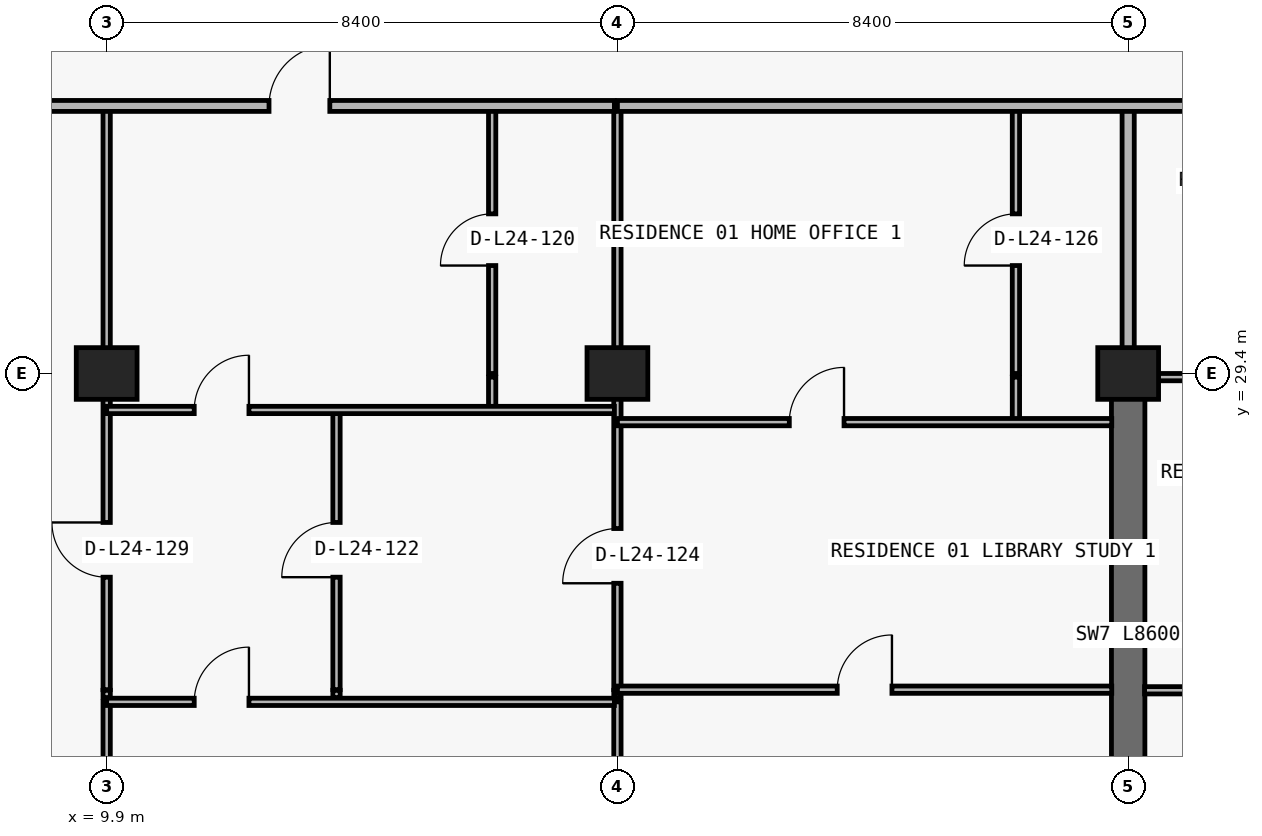
"""IFC4 building model, lengths in metres.
Left out: names, types, materials, properties, quantities, classifications, styles, units other than length and angle.
Written with IfcOpenShell. Run it as: python <this file> out.ifc"""

import sys

from ifc_helpers import new_model, si_unit, direction, frame, frame_2d, origin, origin_2d, place, context, subcontext, project, spatial, rectangle, extrude, element, fill, save


model = new_model("IFC4")
c1 = context("Model", 3, precision=1e-05, world=origin(), true_north=direction((0.0, 1.0)))
c2 = subcontext(c1, "Body", "Model", "MODEL_VIEW")
j1 = project(units=[si_unit("LENGTHUNIT", "METRE"), si_unit("PLANEANGLEUNIT", "RADIAN")], contexts=[c1])
p1 = place(None, origin())
s1 = spatial("IfcSite", under=j1, at=p1, CompositionType="ELEMENT")
p2 = place(p1, origin())
s2 = spatial("IfcBuilding", under=s1, at=p2, CompositionType="ELEMENT")
p3 = place(p2, frame((0.0, 0.0, 91.2)))
s3 = spatial("IfcBuildingStorey", under=s2, at=p3, CompositionType="ELEMENT", Elevation=91.2)
for number, where, z_axis, x_axis in (
    (1, (9.9, 29.4, 0.0), (0.0, 0.0, 1.0), (1.0, 0.0, 0.0)),
    (2, (18.3, 29.4, 0.0), (0.0, 0.0, 1.0), (1.0, 0.0, 0.0)),
    (3, (26.7, 29.4, 0.0), (0.0, 0.0, 1.0), (1.0, 0.0, 0.0)),
):
    element("IfcColumn", number, at=place(p3, frame(where, z_axis=z_axis, x_axis=x_axis)), inside=s3, PredefinedType="COLUMN", context=c2, shape_type="SweptSolid", body=[
        extrude(rectangle(XDim=1.0, YDim=0.85, at=origin_2d()), origin(), (0.0, 0.0, 1.0), 3.05),
    ])
p4 = place(p3, frame((26.7, 20.8, 0.0), z_axis=(0.0, 0.0, 1.0), x_axis=(0.0, 1.0, 0.0)))
e4 = element("IfcWall", 4, at=p4, inside=s3, PredefinedType="SHEAR", context=c2, shape_type="SweptSolid", body=[
    extrude(rectangle(XDim=8.6, YDim=0.55, at=frame_2d((4.3, 0.0))), origin(), (0.0, 0.0, 1.0), 3.05),
])
p5 = place(p3, frame((9.9, 8.84, 0.0), z_axis=(0.0, 0.0, 1.0), x_axis=(0.0, 1.0, 0.0)))
e5 = element("IfcWall", 5, at=p5, inside=s3, PredefinedType="PARTITIONING", context=c2, shape_type="SweptSolid", body=[
    extrude(rectangle(XDim=15.16, YDim=0.12, at=frame_2d((7.58, 0.0))), origin(), (0.0, 0.0, 1.0), 2.174),
])
p6 = place(p3, frame((9.9, 24.07, 0.0), z_axis=(0.0, 0.0, 1.0), x_axis=(0.0, 1.0, 0.0)))
e6 = element("IfcWall", 6, at=p6, inside=s3, PredefinedType="PARTITIONING", context=c2, shape_type="SweptSolid", body=[
    extrude(rectangle(XDim=0.12, YDim=0.12, at=frame_2d((0.06, 0.0))), origin(), (0.0, 0.0, 1.0), 2.174),
])
p7 = place(p3, frame((9.9, 24.2, 0.0), z_axis=(0.0, 0.0, 1.0), x_axis=(0.0, 1.0, 0.0)))
e7 = element("IfcWall", 7, at=p7, inside=s3, PredefinedType="PARTITIONING", context=c2, shape_type="SweptSolid", body=[
    extrude(rectangle(XDim=5.14, YDim=0.12, at=frame_2d((2.57, 0.0))), origin(), (0.0, 0.0, 1.0), 2.174),
])
p8 = place(p7, frame((1.85, 0.0, 0.0)))
e8 = element("IfcOpeningElement", 8, at=p8, cuts=e7, PredefinedType="OPENING", context=c2, shape_type="SweptSolid", body=[
    extrude(rectangle(XDim=0.9, YDim=2.124, at=frame_2d((0.45, 1.062))), frame((0.0, 0.07, 0.0), z_axis=(0.0, -1.0, 0.0), x_axis=(1.0, 0.0, 0.0)), (0.0, 0.0, 1.0), 0.14),
])
p9 = place(p3, frame((9.9, 29.4, 0.0), z_axis=(0.0, 0.0, 1.0), x_axis=(0.0, 1.0, 0.0)))
e9 = element("IfcWall", 9, at=p9, inside=s3, PredefinedType="PARTITIONING", context=c2, shape_type="SweptSolid", body=[
    extrude(rectangle(XDim=4.4, YDim=0.12, at=frame_2d((2.2, 0.0))), origin(), (0.0, 0.0, 1.0), 2.174),
])
p10 = place(p3, frame((13.68, 24.07, 0.0), z_axis=(0.0, 0.0, 1.0), x_axis=(0.0, 1.0, 0.0)))
e10 = element("IfcWall", 10, at=p10, inside=s3, PredefinedType="PARTITIONING", context=c2, shape_type="SweptSolid", body=[
    extrude(rectangle(XDim=0.12, YDim=0.12, at=frame_2d((0.06, 0.0))), origin(), (0.0, 0.0, 1.0), 3.05),
])
p11 = place(p3, frame((13.68, 24.2, 0.0), z_axis=(0.0, 0.0, 1.0), x_axis=(0.0, 1.0, 0.0)))
e11 = element("IfcWall", 11, at=p11, inside=s3, PredefinedType="PARTITIONING", context=c2, shape_type="SweptSolid", body=[
    extrude(rectangle(XDim=4.6, YDim=0.12, at=frame_2d((2.3, 0.0))), origin(), (0.0, 0.0, 1.0), 3.05),
])
p12 = place(p11, frame((1.85, 0.0, 0.0)))
e12 = element("IfcOpeningElement", 12, at=p12, cuts=e11, PredefinedType="OPENING", context=c2, shape_type="SweptSolid", body=[
    extrude(rectangle(XDim=0.9, YDim=2.15, at=frame_2d((0.45, 1.075))), frame((0.0, 0.07, 0.0), z_axis=(0.0, -1.0, 0.0), x_axis=(1.0, 0.0, 0.0)), (0.0, 0.0, 1.0), 0.14),
])
p13 = place(p3, frame((16.24, 28.8, 0.0), z_axis=(0.0, 0.0, 1.0), x_axis=(0.0, 1.0, 0.0)))
e13 = element("IfcWall", 13, at=p13, inside=s3, PredefinedType="PARTITIONING", context=c2, shape_type="SweptSolid", body=[
    extrude(rectangle(XDim=0.54, YDim=0.12, at=frame_2d((0.27, 0.0))), origin(), (0.0, 0.0, 1.0), 3.05),
])
p14 = place(p3, frame((16.24, 29.4, 0.0), z_axis=(0.0, 0.0, 1.0), x_axis=(0.0, 1.0, 0.0)))
e14 = element("IfcWall", 14, at=p14, inside=s3, PredefinedType="PARTITIONING", context=c2, shape_type="SweptSolid", body=[
    extrude(rectangle(XDim=4.4, YDim=0.12, at=frame_2d((2.2, 0.0))), origin(), (0.0, 0.0, 1.0), 3.05),
])
p15 = place(p14, frame((1.775, 0.0, 0.0)))
e15 = element("IfcOpeningElement", 15, at=p15, cuts=e14, PredefinedType="OPENING", context=c2, shape_type="SweptSolid", body=[
    extrude(rectangle(XDim=0.85, YDim=2.1, at=frame_2d((0.425, 1.05))), frame((0.0, 0.07, 0.0), z_axis=(0.0, -1.0, 0.0), x_axis=(1.0, 0.0, 0.0)), (0.0, 0.0, 1.0), 0.14),
])
p16 = place(p3, frame((18.3, 8.84, 0.0), z_axis=(0.0, 0.0, 1.0), x_axis=(0.0, 1.0, 0.0)))
e16 = element("IfcWall", 16, at=p16, inside=s3, PredefinedType="PARTITIONING", context=c2, shape_type="SweptSolid", body=[
    extrude(rectangle(XDim=15.16, YDim=0.12, at=frame_2d((7.58, 0.0))), origin(), (0.0, 0.0, 1.0), 2.174),
])
p17 = place(p3, frame((18.3, 24.07, 0.0), z_axis=(0.0, 0.0, 1.0), x_axis=(0.0, 1.0, 0.0)))
e17 = element("IfcWall", 17, at=p17, inside=s3, PredefinedType="PARTITIONING", context=c2, shape_type="SweptSolid", body=[
    extrude(rectangle(XDim=0.12, YDim=0.12, at=frame_2d((0.06, 0.0))), origin(), (0.0, 0.0, 1.0), 2.174),
])
p18 = place(p3, frame((18.3, 24.2, 0.0), z_axis=(0.0, 0.0, 1.0), x_axis=(0.0, 1.0, 0.0)))
e18 = element("IfcWall", 18, at=p18, inside=s3, PredefinedType="PARTITIONING", context=c2, shape_type="SweptSolid", body=[
    extrude(rectangle(XDim=5.14, YDim=0.12, at=frame_2d((2.57, 0.0))), origin(), (0.0, 0.0, 1.0), 2.174),
])
p19 = place(p18, frame((1.75, 0.0, 0.0)))
e19 = element("IfcOpeningElement", 19, at=p19, cuts=e18, PredefinedType="OPENING", context=c2, shape_type="SweptSolid", body=[
    extrude(rectangle(XDim=0.9, YDim=2.124, at=frame_2d((0.45, 1.062))), frame((0.0, 0.07, 0.0), z_axis=(0.0, -1.0, 0.0), x_axis=(1.0, 0.0, 0.0)), (0.0, 0.0, 1.0), 0.14),
])
p20 = place(p3, frame((18.3, 29.4, 0.0), z_axis=(0.0, 0.0, 1.0), x_axis=(0.0, 1.0, 0.0)))
e20 = element("IfcWall", 20, at=p20, inside=s3, PredefinedType="PARTITIONING", context=c2, shape_type="SweptSolid", body=[
    extrude(rectangle(XDim=4.4, YDim=0.12, at=frame_2d((2.2, 0.0))), origin(), (0.0, 0.0, 1.0), 2.174),
])
p21 = place(p3, frame((24.854, 28.6, 0.0), z_axis=(0.0, 0.0, 1.0), x_axis=(0.0, 1.0, 0.0)))
e21 = element("IfcWall", 21, at=p21, inside=s3, PredefinedType="PARTITIONING", context=c2, shape_type="SweptSolid", body=[
    extrude(rectangle(XDim=0.74, YDim=0.12, at=frame_2d((0.37, 0.0))), origin(), (0.0, 0.0, 1.0), 3.05),
])
p22 = place(p3, frame((24.854, 29.4, 0.0), z_axis=(0.0, 0.0, 1.0), x_axis=(0.0, 1.0, 0.0)))
e22 = element("IfcWall", 22, at=p22, inside=s3, PredefinedType="PARTITIONING", context=c2, shape_type="SweptSolid", body=[
    extrude(rectangle(XDim=4.4, YDim=0.12, at=frame_2d((2.2, 0.0))), origin(), (0.0, 0.0, 1.0), 3.05),
])
p23 = place(p22, frame((1.775, 0.0, 0.0)))
e23 = element("IfcOpeningElement", 23, at=p23, cuts=e22, PredefinedType="OPENING", context=c2, shape_type="SweptSolid", body=[
    extrude(rectangle(XDim=0.85, YDim=2.1, at=frame_2d((0.425, 1.05))), frame((0.0, 0.07, 0.0), z_axis=(0.0, -1.0, 0.0), x_axis=(1.0, 0.0, 0.0)), (0.0, 0.0, 1.0), 0.14),
])
p24 = place(p3, frame((26.7, 29.405, 0.0), z_axis=(0.0, 0.0, 1.0), x_axis=(0.0, 1.0, 0.0)))
e24 = element("IfcWall", 24, at=p24, inside=s3, PredefinedType="PARTITIONING", context=c2, shape_type="SweptSolid", body=[
    extrude(rectangle(XDim=4.395, YDim=0.2, at=frame_2d((2.198, 0.0))), origin(), (0.0, 0.0, 1.0), 2.335),
])
p25 = place(p3, frame((9.9, 24.0, 0.0), z_axis=(0.0, 0.0, 1.0), x_axis=(1.0, 0.0, 0.0)))
e25 = element("IfcWall", 25, at=p25, inside=s3, PredefinedType="PARTITIONING", context=c2, shape_type="SweptSolid", body=[
    extrude(rectangle(XDim=8.35, YDim=0.12, at=frame_2d((4.175, 0.0))), origin(), (0.0, 0.0, 1.0), 3.05),
])
p26 = place(p25, frame((1.44, 0.0, 0.0)))
e26 = element("IfcOpeningElement", 26, at=p26, cuts=e25, PredefinedType="OPENING", context=c2, shape_type="SweptSolid", body=[
    extrude(rectangle(XDim=0.9, YDim=2.15, at=frame_2d((0.45, 1.075))), frame((0.0, 0.07, 0.0), z_axis=(0.0, -1.0, 0.0), x_axis=(1.0, 0.0, 0.0)), (0.0, 0.0, 1.0), 0.14),
])
p27 = place(p3, frame((26.97, 24.19, 0.0), z_axis=(0.0, 0.0, 1.0), x_axis=(1.0, 0.0, 0.0)))
e27 = element("IfcWall", 27, at=p27, inside=s3, PredefinedType="PARTITIONING", context=c2, shape_type="SweptSolid", body=[
    extrude(rectangle(XDim=8.13, YDim=0.12, at=frame_2d((4.065, 0.0))), origin(), (0.0, 0.0, 1.0), 3.05),
])
p28 = place(p27, frame((1.558, 0.0, 0.0)))
e28 = element("IfcOpeningElement", 28, at=p28, cuts=e27, PredefinedType="OPENING", context=c2, shape_type="SweptSolid", body=[
    extrude(rectangle(XDim=0.9, YDim=2.15, at=frame_2d((0.45, 1.075))), frame((0.0, 0.07, 0.0), z_axis=(0.0, -1.0, 0.0), x_axis=(1.0, 0.0, 0.0)), (0.0, 0.0, 1.0), 0.14),
])
p29 = place(p27, frame((5.79, 0.0, 0.0)))
e29 = element("IfcOpeningElement", 29, at=p29, cuts=e27, PredefinedType="OPENING", context=c2, shape_type="SweptSolid", body=[
    extrude(rectangle(XDim=0.9, YDim=2.15, at=frame_2d((0.45, 1.075))), frame((0.0, 0.07, 0.0), z_axis=(0.0, -1.0, 0.0), x_axis=(1.0, 0.0, 0.0)), (0.0, 0.0, 1.0), 0.14),
])
p30 = place(p3, frame((18.3, 24.2, 0.0), z_axis=(0.0, 0.0, 1.0), x_axis=(1.0, 0.0, 0.0)))
e30 = element("IfcWall", 30, at=p30, inside=s3, PredefinedType="PARTITIONING", context=c2, shape_type="SweptSolid", body=[
    extrude(rectangle(XDim=8.13, YDim=0.12, at=frame_2d((4.065, 0.0))), origin(), (0.0, 0.0, 1.0), 3.05),
])
p31 = place(p30, frame((3.615, 0.0, 0.0)))
e31 = element("IfcOpeningElement", 31, at=p31, cuts=e30, PredefinedType="OPENING", context=c2, shape_type="SweptSolid", body=[
    extrude(rectangle(XDim=0.9, YDim=2.15, at=frame_2d((0.45, 1.075))), frame((0.0, 0.07, 0.0), z_axis=(0.0, -1.0, 0.0), x_axis=(1.0, 0.0, 0.0)), (0.0, 0.0, 1.0), 0.14),
])
p32 = place(p3, frame((18.3, 28.6, 0.0), z_axis=(0.0, 0.0, 1.0), x_axis=(1.0, 0.0, 0.0)))
e32 = element("IfcWall", 32, at=p32, inside=s3, PredefinedType="PARTITIONING", context=c2, shape_type="SweptSolid", body=[
    extrude(rectangle(XDim=8.13, YDim=0.12, at=frame_2d((4.065, 0.0))), origin(), (0.0, 0.0, 1.0), 3.05),
])
p33 = place(p32, frame((2.827, 0.0, 0.0)))
e33 = element("IfcOpeningElement", 33, at=p33, cuts=e32, PredefinedType="OPENING", context=c2, shape_type="SweptSolid", body=[
    extrude(rectangle(XDim=0.9, YDim=2.15, at=frame_2d((0.45, 1.075))), frame((0.0, 0.07, 0.0), z_axis=(0.0, -1.0, 0.0), x_axis=(1.0, 0.0, 0.0)), (0.0, 0.0, 1.0), 0.14),
])
p34 = place(p3, frame((9.9, 28.8, 0.0), z_axis=(0.0, 0.0, 1.0), x_axis=(1.0, 0.0, 0.0)))
e34 = element("IfcWall", 34, at=p34, inside=s3, PredefinedType="PARTITIONING", context=c2, shape_type="SweptSolid", body=[
    extrude(rectangle(XDim=8.35, YDim=0.12, at=frame_2d((4.175, 0.0))), origin(), (0.0, 0.0, 1.0), 3.05),
])
p35 = place(p34, frame((1.44, 0.0, 0.0)))
e35 = element("IfcOpeningElement", 35, at=p35, cuts=e34, PredefinedType="OPENING", context=c2, shape_type="SweptSolid", body=[
    extrude(rectangle(XDim=0.9, YDim=2.15, at=frame_2d((0.45, 1.075))), frame((0.0, 0.07, 0.0), z_axis=(0.0, -1.0, 0.0), x_axis=(1.0, 0.0, 0.0)), (0.0, 0.0, 1.0), 0.14),
])
p36 = place(p3, frame((26.97, 29.34, 0.0), z_axis=(0.0, 0.0, 1.0), x_axis=(1.0, 0.0, 0.0)))
e36 = element("IfcWall", 36, at=p36, inside=s3, PredefinedType="PARTITIONING", context=c2, shape_type="SweptSolid", body=[
    extrude(rectangle(XDim=8.13, YDim=0.12, at=frame_2d((4.065, 0.0))), origin(), (0.0, 0.0, 1.0), 2.174),
])
p37 = place(p36, frame((1.558, 0.0, 0.0)))
e37 = element("IfcOpeningElement", 37, at=p37, cuts=e36, PredefinedType="OPENING", context=c2, shape_type="SweptSolid", body=[
    extrude(rectangle(XDim=0.9, YDim=2.124, at=frame_2d((0.45, 1.062))), frame((0.0, 0.07, 0.0), z_axis=(0.0, -1.0, 0.0), x_axis=(1.0, 0.0, 0.0)), (0.0, 0.0, 1.0), 0.14),
])
p38 = place(p3, frame((7.705, 33.8, 0.0), z_axis=(0.0, 0.0, 1.0), x_axis=(1.0, 0.0, 0.0)))
e38 = element("IfcWall", 38, at=p38, inside=s3, PredefinedType="PARTITIONING", context=c2, shape_type="SweptSolid", body=[
    extrude(rectangle(XDim=10.545, YDim=0.18, at=frame_2d((5.272, 0.0))), origin(), (0.0, 0.0, 1.0), 3.05),
])
p39 = place(p38, frame((4.865, 0.0, 0.0)))
e39 = element("IfcOpeningElement", 39, at=p39, cuts=e38, PredefinedType="OPENING", context=c2, shape_type="SweptSolid", body=[
    extrude(rectangle(XDim=1.0, YDim=2.2, at=frame_2d((0.5, 1.1))), frame((0.0, 0.1, 0.0), z_axis=(0.0, -1.0, 0.0), x_axis=(1.0, 0.0, 0.0)), (0.0, 0.0, 1.0), 0.2),
])
p40 = place(p3, frame((18.3, 33.8, 0.0), z_axis=(0.0, 0.0, 1.0), x_axis=(1.0, 0.0, 0.0)))
e40 = element("IfcWall", 40, at=p40, inside=s3, PredefinedType="PARTITIONING", context=c2, shape_type="SweptSolid", body=[
    extrude(rectangle(XDim=41.2, YDim=0.18, at=frame_2d((20.6, 0.0))), origin(), (0.0, 0.0, 1.0), 3.05),
])
p41 = place(p40, frame((10.946, 0.0, 0.0)))
e41 = element("IfcOpeningElement", 41, at=p41, cuts=e40, PredefinedType="OPENING", context=c2, shape_type="SweptSolid", body=[
    extrude(rectangle(XDim=1.0, YDim=2.2, at=frame_2d((0.5, 1.1))), frame((0.0, 0.1, 0.0), z_axis=(0.0, -1.0, 0.0), x_axis=(1.0, 0.0, 0.0)), (0.0, 0.0, 1.0), 0.2),
])
p42 = place(p40, frame((19.113, 0.0, 0.0)))
e42 = element("IfcOpeningElement", 42, at=p42, cuts=e40, PredefinedType="OPENING", context=c2, shape_type="SweptSolid", body=[
    extrude(rectangle(XDim=1.0, YDim=2.2, at=frame_2d((0.5, 1.1))), frame((0.0, 0.1, 0.0), z_axis=(0.0, -1.0, 0.0), x_axis=(1.0, 0.0, 0.0)), (0.0, 0.0, 1.0), 0.2),
])
p43 = place(p40, frame((26.976, 0.0, 0.0)))
e43 = element("IfcOpeningElement", 43, at=p43, cuts=e40, PredefinedType="OPENING", context=c2, shape_type="SweptSolid", body=[
    extrude(rectangle(XDim=1.0, YDim=2.2, at=frame_2d((0.5, 1.1))), frame((0.0, 0.1, 0.0), z_axis=(0.0, -1.0, 0.0), x_axis=(1.0, 0.0, 0.0)), (0.0, 0.0, 1.0), 0.2),
])
p44 = place(p40, frame((35.47, 0.0, 0.0)))
e44 = element("IfcOpeningElement", 44, at=p44, cuts=e40, PredefinedType="OPENING", context=c2, shape_type="SweptSolid", body=[
    extrude(rectangle(XDim=1.0, YDim=2.2, at=frame_2d((0.5, 1.1))), frame((0.0, 0.1, 0.0), z_axis=(0.0, -1.0, 0.0), x_axis=(1.0, 0.0, 0.0)), (0.0, 0.0, 1.0), 0.2),
])
p45 = place(p39, origin())
e45 = element("IfcDoor", 45, at=p45, inside=s3, OperationType="SINGLE_SWING_RIGHT", PredefinedType="DOOR", context=c2, shape_type="SweptSolid", body=[
    extrude(rectangle(XDim=1.0, YDim=2.2, at=frame_2d((0.5, 1.1))), frame((0.0, 0.025, 0.0), z_axis=(0.0, -1.0, 0.0), x_axis=(1.0, 0.0, 0.0)), (0.0, 0.0, 1.0), 0.05),
])
fill(e39, e45)
p46 = place(p15, origin())
e46 = element("IfcDoor", 46, at=p46, inside=s3, OperationType="SINGLE_SWING_LEFT", PredefinedType="DOOR", context=c2, shape_type="SweptSolid", body=[
    extrude(rectangle(XDim=0.85, YDim=2.1, at=frame_2d((0.425, 1.05))), frame((0.0, 0.025, 0.0), z_axis=(0.0, -1.0, 0.0), x_axis=(1.0, 0.0, 0.0)), (0.0, 0.0, 1.0), 0.05),
])
fill(e15, e46)
p47 = place(p35, origin())
e47 = element("IfcDoor", 47, at=p47, inside=s3, OperationType="SINGLE_SWING_RIGHT", PredefinedType="DOOR", context=c2, shape_type="SweptSolid", body=[
    extrude(rectangle(XDim=0.9, YDim=2.15, at=frame_2d((0.45, 1.075))), frame((0.0, 0.025, 0.0), z_axis=(0.0, -1.0, 0.0), x_axis=(1.0, 0.0, 0.0)), (0.0, 0.0, 1.0), 0.05),
])
fill(e35, e47)
p48 = place(p12, origin())
e48 = element("IfcDoor", 48, at=p48, inside=s3, OperationType="SINGLE_SWING_LEFT", PredefinedType="DOOR", context=c2, shape_type="SweptSolid", body=[
    extrude(rectangle(XDim=0.9, YDim=2.15, at=frame_2d((0.45, 1.075))), frame((0.0, 0.025, 0.0), z_axis=(0.0, -1.0, 0.0), x_axis=(1.0, 0.0, 0.0)), (0.0, 0.0, 1.0), 0.05),
])
fill(e12, e48)
p49 = place(p26, origin())
e49 = element("IfcDoor", 49, at=p49, inside=s3, OperationType="SINGLE_SWING_RIGHT", PredefinedType="DOOR", context=c2, shape_type="SweptSolid", body=[
    extrude(rectangle(XDim=0.9, YDim=2.15, at=frame_2d((0.45, 1.075))), frame((0.0, 0.025, 0.0), z_axis=(0.0, -1.0, 0.0), x_axis=(1.0, 0.0, 0.0)), (0.0, 0.0, 1.0), 0.05),
])
fill(e26, e49)
p50 = place(p19, origin())
e50 = element("IfcDoor", 50, at=p50, inside=s3, OperationType="SINGLE_SWING_LEFT", PredefinedType="DOOR", context=c2, shape_type="SweptSolid", body=[
    extrude(rectangle(XDim=0.9, YDim=2.124, at=frame_2d((0.45, 1.062))), frame((0.0, 0.025, 0.0), z_axis=(0.0, -1.0, 0.0), x_axis=(1.0, 0.0, 0.0)), (0.0, 0.0, 1.0), 0.05),
])
fill(e19, e50)
p51 = place(p33, origin())
e51 = element("IfcDoor", 51, at=p51, inside=s3, OperationType="SINGLE_SWING_RIGHT", PredefinedType="DOOR", context=c2, shape_type="SweptSolid", body=[
    extrude(rectangle(XDim=0.9, YDim=2.15, at=frame_2d((0.45, 1.075))), frame((0.0, 0.025, 0.0), z_axis=(0.0, -1.0, 0.0), x_axis=(1.0, 0.0, 0.0)), (0.0, 0.0, 1.0), 0.05),
])
fill(e33, e51)
p52 = place(p23, origin())
e52 = element("IfcDoor", 52, at=p52, inside=s3, OperationType="SINGLE_SWING_LEFT", PredefinedType="DOOR", context=c2, shape_type="SweptSolid", body=[
    extrude(rectangle(XDim=0.85, YDim=2.1, at=frame_2d((0.425, 1.05))), frame((0.0, 0.025, 0.0), z_axis=(0.0, -1.0, 0.0), x_axis=(1.0, 0.0, 0.0)), (0.0, 0.0, 1.0), 0.05),
])
fill(e23, e52)
p53 = place(p31, origin())
e53 = element("IfcDoor", 53, at=p53, inside=s3, OperationType="SINGLE_SWING_RIGHT", PredefinedType="DOOR", context=c2, shape_type="SweptSolid", body=[
    extrude(rectangle(XDim=0.9, YDim=2.15, at=frame_2d((0.45, 1.075))), frame((0.0, 0.025, 0.0), z_axis=(0.0, -1.0, 0.0), x_axis=(1.0, 0.0, 0.0)), (0.0, 0.0, 1.0), 0.05),
])
fill(e31, e53)
p54 = place(p8, origin())
e54 = element("IfcDoor", 54, at=p54, inside=s3, OperationType="SINGLE_SWING_RIGHT", PredefinedType="DOOR", context=c2, shape_type="SweptSolid", body=[
    extrude(rectangle(XDim=0.9, YDim=2.124, at=frame_2d((0.45, 1.062))), frame((0.0, 0.025, 0.0), z_axis=(0.0, -1.0, 0.0), x_axis=(1.0, 0.0, 0.0)), (0.0, 0.0, 1.0), 0.05),
])
fill(e8, e54)
save(model, sys.argv[1])
